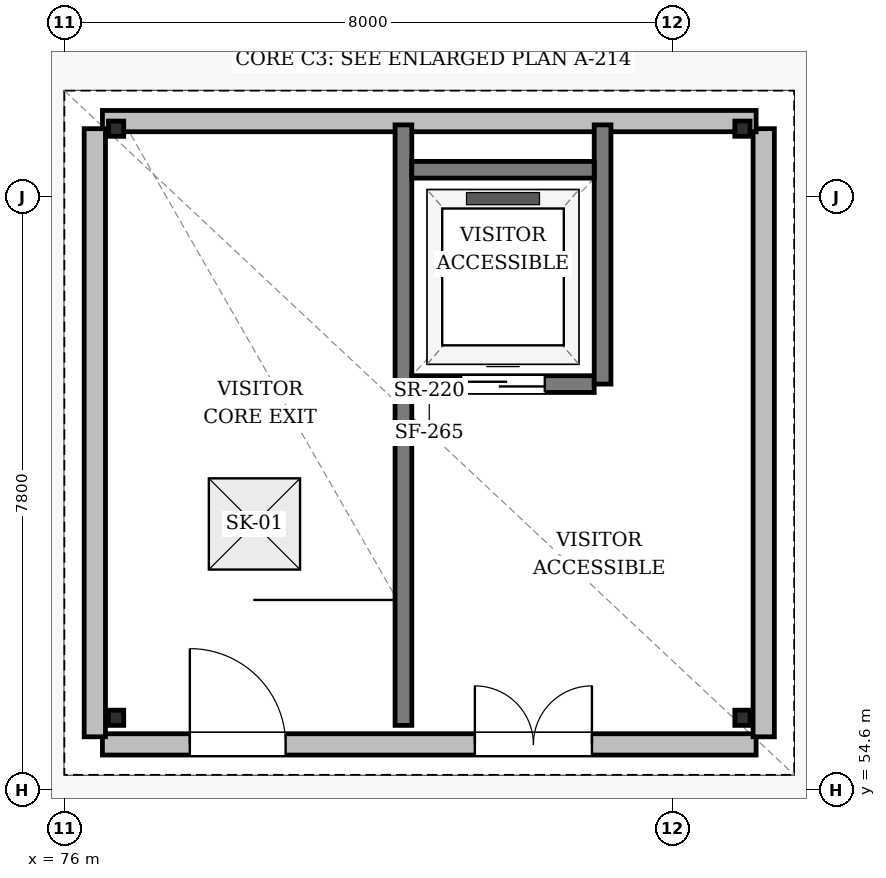
"""IFC4 building model, lengths in metres.
Left out: names, types, materials, properties, quantities, classifications, styles, units other than length and angle.
Written with IfcOpenShell. Run it as: python <this file> out.ifc"""

import sys

from ifc_helpers import new_model, si_unit, direction, frame, frame_2d, origin, origin_2d, place, context, subcontext, project, spatial, rectangle, i_section, extrude, element, fill, save


model = new_model("IFC4")
c1 = context("Model", 3, precision=1e-05, world=origin(), true_north=direction((0.0, 1.0)))
c2 = subcontext(c1, "Body", "Model", "MODEL_VIEW")
j1 = project(units=[si_unit("LENGTHUNIT", "METRE"), si_unit("PLANEANGLEUNIT", "RADIAN")], contexts=[c1])
p1 = place(None, origin())
s1 = spatial("IfcSite", under=j1, at=p1, CompositionType="ELEMENT")
p2 = place(p1, origin())
s2 = spatial("IfcBuilding", under=s1, at=p2, CompositionType="ELEMENT")
p3 = place(p2, frame((0.0, 0.0, 13.2)))
s3 = spatial("IfcBuildingStorey", under=s2, at=p3, CompositionType="ELEMENT", Elevation=13.2)
for number, where, z_axis, x_axis in (
    (1, (76.68, 55.55, 0.0), (0.0, 0.0, 1.0), (1.0, 0.0, 0.0)),
    (2, (84.92, 55.55, 0.0), (0.0, 0.0, 1.0), (1.0, 0.0, 0.0)),
    (3, (84.92, 63.3, 0.0), (0.0, 0.0, 1.0), (1.0, 0.0, 0.0)),
    (4, (76.68, 63.3, 0.0), (0.0, 0.0, 1.0), (1.0, 0.0, 0.0)),
):
    element("IfcColumn", number, at=place(p3, frame(where, z_axis=z_axis, x_axis=x_axis)), inside=s3, PredefinedType="COLUMN", context=c2, shape_type="SweptSolid", body=[
        extrude(i_section(OverallWidth=0.2, OverallDepth=0.2, WebThickness=0.008, FlangeThickness=0.012, FilletRadius=0.013, at=origin_2d()), origin(), (0.0, 0.0, 1.0), 3.38),
    ])
p4 = place(p3, frame((76.5, 55.2, 0.0), z_axis=(0.0, 0.0, 1.0), x_axis=(1.0, 0.0, 0.0)))
e5 = element("IfcWall", 5, at=p4, inside=s3, PredefinedType="SOLIDWALL", context=c2, shape_type="SweptSolid", body=[
    extrude(rectangle(XDim=8.6, YDim=0.28, at=frame_2d((4.3, 0.0))), origin(), (0.0, 0.0, 1.0), 3.08),
])
p5 = place(p4, frame((4.9, 0.0, 0.0)))
e6 = element("IfcOpeningElement", 6, at=p5, cuts=e5, PredefinedType="OPENING", context=c2, shape_type="SweptSolid", body=[
    extrude(rectangle(XDim=1.54, YDim=2.24, at=frame_2d((0.77, 1.12))), frame((0.0, 0.15, 0.0), z_axis=(0.0, -1.0, 0.0), x_axis=(1.0, 0.0, 0.0)), (0.0, 0.0, 1.0), 0.3),
])
p6 = place(p4, frame((1.15, 0.0, 0.0)))
e7 = element("IfcOpeningElement", 7, at=p6, cuts=e5, PredefinedType="OPENING", context=c2, shape_type="SweptSolid", body=[
    extrude(rectangle(XDim=1.26, YDim=2.24, at=frame_2d((0.63, 1.12))), frame((0.0, 0.15, 0.0), z_axis=(0.0, -1.0, 0.0), x_axis=(1.0, 0.0, 0.0)), (0.0, 0.0, 1.0), 0.3),
])
p7 = place(p3, frame((85.2, 55.3, 0.0), z_axis=(0.0, 0.0, 1.0), x_axis=(0.0, 1.0, 0.0)))
e8 = element("IfcWall", 8, at=p7, inside=s3, PredefinedType="SOLIDWALL", context=c2, shape_type="SweptSolid", body=[
    extrude(rectangle(XDim=8.0, YDim=0.28, at=frame_2d((4.0, 0.0))), origin(), (0.0, 0.0, 1.0), 3.08),
])
p8 = place(p3, frame((85.1, 63.4, 0.0), z_axis=(0.0, 0.0, 1.0), x_axis=(-1.0, 0.0, 0.0)))
e9 = element("IfcWall", 9, at=p8, inside=s3, PredefinedType="SOLIDWALL", context=c2, shape_type="SweptSolid", body=[
    extrude(rectangle(XDim=8.6, YDim=0.28, at=frame_2d((4.3, 0.0))), origin(), (0.0, 0.0, 1.0), 3.08),
])
p9 = place(p3, frame((76.4, 63.3, 0.0), z_axis=(0.0, 0.0, 1.0), x_axis=(0.0, -1.0, 0.0)))
e10 = element("IfcWall", 10, at=p9, inside=s3, PredefinedType="SOLIDWALL", context=c2, shape_type="SweptSolid", body=[
    extrude(rectangle(XDim=8.0, YDim=0.28, at=frame_2d((4.0, 0.0))), origin(), (0.0, 0.0, 1.0), 3.08),
])
p10 = place(p3, frame((80.46, 55.45, 0.0), z_axis=(0.0, 0.0, 1.0), x_axis=(0.0, 1.0, 0.0)))
e11 = element("IfcWall", 11, at=p10, inside=s3, PredefinedType="SHEAR", context=c2, shape_type="SweptSolid", body=[
    extrude(rectangle(XDim=7.9, YDim=0.22, at=frame_2d((3.95, 0.0))), origin(), (0.0, 0.0, 1.0), 3.62),
])
p11 = place(p3, frame((80.57, 59.94, 0.0), z_axis=(0.0, 0.0, 1.0), x_axis=(1.0, 0.0, 0.0)))
e12 = element("IfcWall", 12, at=p11, inside=s3, PredefinedType="SHEAR", context=c2, shape_type="SweptSolid", body=[
    extrude(rectangle(XDim=2.4, YDim=0.22, at=frame_2d((1.2, 0.0))), origin(), (0.0, 0.0, 1.0), 3.62),
])
p12 = place(p11, frame((0.65, 0.0, 0.0)))
e13 = element("IfcOpeningElement", 13, at=p12, cuts=e12, PredefinedType="OPENING", context=c2, shape_type="SweptSolid", body=[
    extrude(rectangle(XDim=1.1, YDim=2.15, at=frame_2d((0.55, 1.075))), frame((0.0, 0.12, 0.0), z_axis=(0.0, -1.0, 0.0), x_axis=(1.0, 0.0, 0.0)), (0.0, 0.0, 1.0), 0.24),
])
p13 = place(p3, frame((83.08, 59.94, 0.0), z_axis=(0.0, 0.0, 1.0), x_axis=(0.0, 1.0, 0.0)))
e14 = element("IfcWall", 14, at=p13, inside=s3, PredefinedType="SHEAR", context=c2, shape_type="SweptSolid", body=[
    extrude(rectangle(XDim=3.41, YDim=0.22, at=frame_2d((1.705, 0.0))), origin(), (0.0, 0.0, 1.0), 3.62),
])
p14 = place(p3, frame((80.57, 62.76, 0.0), z_axis=(0.0, 0.0, 1.0), x_axis=(1.0, 0.0, 0.0)))
e15 = element("IfcWall", 15, at=p14, inside=s3, PredefinedType="SHEAR", context=c2, shape_type="SweptSolid", body=[
    extrude(rectangle(XDim=2.4, YDim=0.22, at=frame_2d((1.2, 0.0))), origin(), (0.0, 0.0, 1.0), 3.62),
])
p15 = place(p5, frame((1.54, 0.0, 0.0), z_axis=(0.0, 0.0, 1.0), x_axis=(-1.0, 0.0, 0.0)))
e16 = element("IfcDoor", 16, at=p15, inside=s3, OperationType="DOUBLE_DOOR_SINGLE_SWING", PredefinedType="DOOR", context=c2, shape_type="SweptSolid", body=[
    extrude(rectangle(XDim=1.54, YDim=2.24, at=frame_2d((0.77, 1.12))), frame((0.0, 0.025, 0.0), z_axis=(0.0, -1.0, 0.0), x_axis=(1.0, 0.0, 0.0)), (0.0, 0.0, 1.0), 0.05),
])
fill(e6, e16)
p16 = place(p6, frame((1.26, 0.0, 0.0), z_axis=(0.0, 0.0, 1.0), x_axis=(-1.0, 0.0, 0.0)))
e17 = element("IfcDoor", 17, at=p16, inside=s3, OperationType="SINGLE_SWING_LEFT", PredefinedType="DOOR", context=c2, shape_type="SweptSolid", body=[
    extrude(rectangle(XDim=1.26, YDim=2.24, at=frame_2d((0.63, 1.12))), frame((0.0, 0.025, 0.0), z_axis=(0.0, -1.0, 0.0), x_axis=(1.0, 0.0, 0.0)), (0.0, 0.0, 1.0), 0.05),
])
fill(e7, e17)
p17 = place(p3, frame((0.0, 0.0, 3.38)))
p18 = place(p17, frame((78.5, 58.1, 0.17)))
e18 = element("IfcWindow", 18, at=p18, inside=s3, PartitioningType="SINGLE_PANEL", PredefinedType="SKYLIGHT", context=c2, shape_type="SweptSolid", body=[
    extrude(rectangle(XDim=1.2, YDim=1.2, at=origin_2d()), origin(), (0.0, 0.0, 1.0), 0.05),
])
p19 = place(p12, origin())
e19 = element("IfcDoor", 19, at=p19, inside=s3, OperationType="SLIDING_TO_LEFT", PredefinedType="DOOR", context=c2, shape_type="SweptSolid", body=[
    extrude(rectangle(XDim=1.1, YDim=2.15, at=frame_2d((0.55, 1.075))), frame((0.0, 0.025, 0.0), z_axis=(0.0, -1.0, 0.0), x_axis=(1.0, 0.0, 0.0)), (0.0, 0.0, 1.0), 0.05),
])
fill(e13, e19)
save(model, sys.argv[1])
